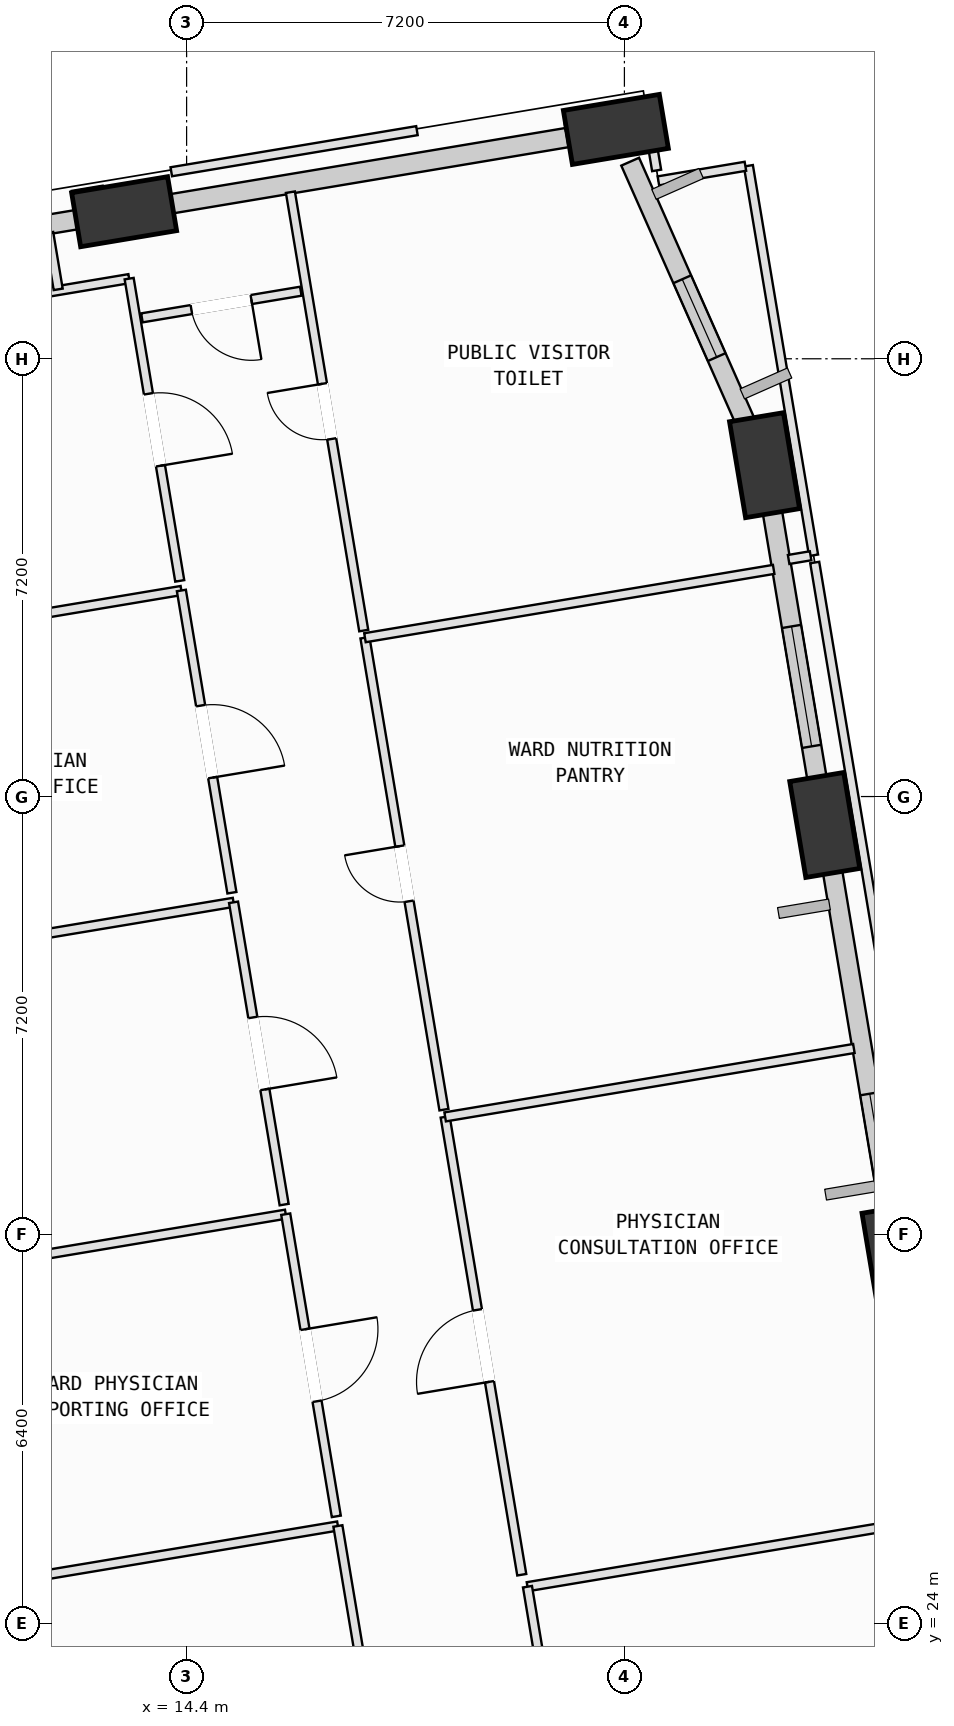
"""IFC4 building model, lengths in metres.
Left out: names, types, materials, properties, quantities, classifications, styles, units other than length and angle.
Written with IfcOpenShell. Run it as: python <this file> out.ifc"""

import sys

from ifc_helpers import new_model, si_unit, direction, frame, frame_2d, origin, origin_2d, place, context, subcontext, project, spatial, rectangle, extrude, element, fill, save


model = new_model("IFC4")
c1 = context("Model", 3, precision=1e-05, world=origin(), true_north=direction((0.0, 1.0)))
c2 = subcontext(c1, "Body", "Model", "MODEL_VIEW")
j1 = project(units=[si_unit("LENGTHUNIT", "METRE"), si_unit("PLANEANGLEUNIT", "RADIAN")], contexts=[c1])
p1 = place(None, origin())
s1 = spatial("IfcSite", under=j1, at=p1, CompositionType="ELEMENT")
p2 = place(p1, origin())
s2 = spatial("IfcBuilding", under=s1, at=p2, CompositionType="ELEMENT")
p3 = place(p2, frame((0.0, 0.0, 63.0)))
s3 = spatial("IfcBuildingStorey", under=s2, at=p3, CompositionType="ELEMENT", Elevation=63.0)
p4 = place(p3, frame((26.083, 30.031, 0.002), z_axis=(-0.021426220941, -0.03131524599, 0.999279876924), x_axis=(0.42032356273, 0.906602224927, 0.037423366641)))
e1 = element("IfcColumn", 1, at=p4, inside=s3, PredefinedType="COLUMN", context=c2, shape_type="SweptSolid", body=[
    extrude(rectangle(XDim=1.6, YDim=0.9, at=origin_2d()), origin(), (0.0, 0.0, 1.0), 4.0),
])
p5 = place(p3, frame((24.895, 37.132, 0.002), z_axis=(-0.050725527972, -0.036398005047, 0.998049150113), x_axis=(0.703550558239, 0.707972386079, 0.061576883259)))
e2 = element("IfcColumn", 2, at=p5, inside=s3, PredefinedType="COLUMN", context=c2, shape_type="SweptSolid", body=[
    extrude(rectangle(XDim=1.6, YDim=0.9, at=origin_2d()), origin(), (0.0, 0.0, 1.0), 4.004),
])
p6 = place(p3, frame((23.905, 43.05, 0.002), z_axis=(-0.075045854901, -0.040657446126, 0.996350887859), x_axis=(0.785410921384, 0.613223631636, 0.084181127184)))
e3 = element("IfcColumn", 3, at=p6, inside=s3, PredefinedType="COLUMN", context=c2, shape_type="SweptSolid", body=[
    extrude(rectangle(XDim=1.6, YDim=0.9, at=origin_2d()), origin(), (0.0, 0.0, 1.0), 4.011),
])
p7 = place(p3, frame((21.46, 48.572, 0.002), z_axis=(-0.09751137938, -0.050820065094, 0.993936040133), x_axis=(0.601306574256, -0.79881226347, 0.018148594608)))
e4 = element("IfcColumn", 4, at=p7, inside=s3, PredefinedType="COLUMN", context=c2, shape_type="SweptSolid", body=[
    extrude(rectangle(XDim=1.6, YDim=0.9, at=origin_2d()), origin(), (0.0, 0.0, 1.0), 4.021),
])
p8 = place(p3, frame((13.372, 47.219, 0.002), z_axis=(-0.091527721681, -0.083950923529, 0.99225748604), x_axis=(0.78736575955, -0.616145251126, 0.020498541485)))
e5 = element("IfcColumn", 5, at=p8, inside=s3, PredefinedType="COLUMN", context=c2, shape_type="SweptSolid", body=[
    extrude(rectangle(XDim=1.6, YDim=0.9, at=origin_2d()), origin(), (0.0, 0.0, 1.0), 4.028),
])
p9 = place(p3, frame((25.993, 30.574, 0.0), z_axis=(0.0, 0.0, 1.0), x_axis=(-0.165052568098, 0.986284771131, 0.0)))
e6 = element("IfcWall", 6, at=p9, inside=s3, PredefinedType="SOLIDWALL", context=c2, shape_type="SweptSolid", body=[
    extrude(rectangle(XDim=5.997, YDim=0.32, at=frame_2d((2.998, 0.0))), origin(), (0.0, 0.0, 1.0), 3.165),
])
p10 = place(p9, frame((0.567, 0.0, 0.75)))
e7 = element("IfcOpeningElement", 7, at=p10, cuts=e6, PredefinedType="OPENING", context=c2, shape_type="SweptSolid", body=[
    extrude(rectangle(XDim=1.6, YDim=1.95, at=frame_2d((0.8, 0.975))), frame((0.0, 0.17, 0.0), z_axis=(0.0, -1.0, 0.0), x_axis=(1.0, 0.0, 0.0)), (0.0, 0.0, 1.0), 0.34),
])
p11 = place(p3, frame((24.806, 37.667, 0.0), z_axis=(0.0, 0.0, 1.0), x_axis=(-0.165048338361, 0.986285478958, 0.0)))
e8 = element("IfcWall", 8, at=p11, inside=s3, PredefinedType="SOLIDWALL", context=c2, shape_type="SweptSolid", body=[
    extrude(rectangle(XDim=4.816, YDim=0.32, at=frame_2d((2.408, 0.0))), origin(), (0.0, 0.0, 1.0), 3.165),
])
p12 = place(p11, frame((0.769, 0.0, 0.75)))
e9 = element("IfcOpeningElement", 9, at=p12, cuts=e8, PredefinedType="OPENING", context=c2, shape_type="SweptSolid", body=[
    extrude(rectangle(XDim=2.0, YDim=1.95, at=frame_2d((1.0, 0.975))), frame((0.0, 0.17, 0.0), z_axis=(0.0, -1.0, 0.0), x_axis=(1.0, 0.0, 0.0)), (0.0, 0.0, 1.0), 0.34),
])
p13 = place(p3, frame((21.695, 48.042, 0.0), z_axis=(0.0, 0.0, 1.0), x_axis=(0.404877849422, -0.914370782039, 0.0)))
e10 = element("IfcWall", 10, at=p13, inside=s3, PredefinedType="SOLIDWALL", context=c2, shape_type="SweptSolid", body=[
    extrude(rectangle(XDim=4.889, YDim=0.32, at=frame_2d((2.445, 0.0))), origin(), (0.0, 0.0, 1.0), 3.165),
])
p14 = place(p13, frame((2.115, 0.0, 0.75)))
e11 = element("IfcOpeningElement", 11, at=p14, cuts=e10, PredefinedType="OPENING", context=c2, shape_type="SweptSolid", body=[
    extrude(rectangle(XDim=1.4, YDim=1.85, at=frame_2d((0.7, 0.925))), frame((0.0, 0.17, 0.0), z_axis=(0.0, -1.0, 0.0), x_axis=(1.0, 0.0, 0.0)), (0.0, 0.0, 1.0), 0.34),
])
p15 = place(p3, frame((13.75, 47.282, 0.0), z_axis=(0.0, 0.0, 1.0), x_axis=(0.986281570607, 0.165071691945, 0.0)))
e12 = element("IfcWall", 12, at=p15, inside=s3, PredefinedType="SOLIDWALL", context=c2, shape_type="SweptSolid", body=[
    extrude(rectangle(XDim=7.003, YDim=0.32, at=frame_2d((3.501, 0.0))), origin(), (0.0, 0.0, 1.0), 3.165),
])
p16 = place(p3, frame((5.643, 45.926, 0.0), z_axis=(0.0, 0.0, 1.0), x_axis=(0.986289610151, 0.16502364954, 0.0)))
e13 = element("IfcWall", 13, at=p16, inside=s3, PredefinedType="SOLIDWALL", context=c2, shape_type="SweptSolid", body=[
    extrude(rectangle(XDim=7.035, YDim=0.32, at=frame_2d((3.517, 0.0))), origin(), (0.0, 0.0, 1.0), 3.165),
])
p17 = place(p3, frame((6.074, 23.793, 0.0), z_axis=(0.0, 0.0, 1.0), x_axis=(0.986279342954, 0.165085001324, 0.0)))
e14 = element("IfcWall", 14, at=p17, inside=s3, PredefinedType="PARTITIONING", context=c2, shape_type="SweptSolid", body=[
    extrude(rectangle(XDim=10.964, YDim=0.15, at=frame_2d((5.482, 0.0))), origin(), (0.0, 0.0, 1.0), 3.78),
])
p18 = place(p3, frame((16.888, 25.603, 0.0), z_axis=(0.0, 0.0, 1.0), x_axis=(0.165082339721, -0.986279788454, 0.0)))
e15 = element("IfcWall", 15, at=p18, inside=s3, PredefinedType="PARTITIONING", context=c2, shape_type="SweptSolid", body=[
    extrude(rectangle(XDim=5.04, YDim=0.15, at=frame_2d((2.52, 0.0))), origin(), (0.0, 0.0, 1.0), 3.78),
])
p19 = place(p3, frame((4.855, 28.861, 0.0), z_axis=(0.0, 0.0, 1.0), x_axis=(0.986288313617, 0.165031398291, 0.0)))
e16 = element("IfcWall", 16, at=p19, inside=s3, PredefinedType="PARTITIONING", context=c2, shape_type="SweptSolid", body=[
    extrude(rectangle(XDim=11.33, YDim=0.15, at=frame_2d((5.665, 0.0))), origin(), (0.0, 0.0, 1.0), 3.78),
])
p20 = place(p3, frame((16.03, 30.731, 0.0), z_axis=(0.0, 0.0, 1.0), x_axis=(0.165113892935, -0.986274506595, 0.0)))
e17 = element("IfcWall", 17, at=p20, inside=s3, PredefinedType="PARTITIONING", context=c2, shape_type="SweptSolid", body=[
    extrude(rectangle(XDim=5.039, YDim=0.15, at=frame_2d((2.52, 0.0))), origin(), (0.0, 0.0, 1.0), 3.78),
])
p21 = place(p20, frame((1.92, 0.0, 0.0)))
e18 = element("IfcOpeningElement", 18, at=p21, cuts=e17, PredefinedType="OPENING", context=c2, shape_type="SweptSolid", body=[
    extrude(rectangle(XDim=1.2, YDim=2.15, at=frame_2d((0.6, 1.075))), frame((0.0, 0.085, 0.0), z_axis=(0.0, -1.0, 0.0), x_axis=(1.0, 0.0, 0.0)), (0.0, 0.0, 1.0), 0.17),
])
p22 = place(p3, frame((4.357, 34.05, 0.0), z_axis=(0.0, 0.0, 1.0), x_axis=(0.986282376627, 0.165066876009, 0.0)))
e19 = element("IfcWall", 19, at=p22, inside=s3, PredefinedType="PARTITIONING", context=c2, shape_type="SweptSolid", body=[
    extrude(rectangle(XDim=10.966, YDim=0.15, at=frame_2d((5.483, 0.0))), origin(), (0.0, 0.0, 1.0), 3.78),
])
p23 = place(p3, frame((15.172, 35.86, 0.0), z_axis=(0.0, 0.0, 1.0), x_axis=(0.165027335267, -0.986288993457, 0.0)))
e20 = element("IfcWall", 20, at=p23, inside=s3, PredefinedType="PARTITIONING", context=c2, shape_type="SweptSolid", body=[
    extrude(rectangle(XDim=5.04, YDim=0.15, at=frame_2d((2.52, 0.0))), origin(), (0.0, 0.0, 1.0), 3.78),
])
p24 = place(p23, frame((1.92, 0.0, 0.0)))
e21 = element("IfcOpeningElement", 21, at=p24, cuts=e20, PredefinedType="OPENING", context=c2, shape_type="SweptSolid", body=[
    extrude(rectangle(XDim=1.2, YDim=2.15, at=frame_2d((0.6, 1.075))), frame((0.0, 0.085, 0.0), z_axis=(0.0, -1.0, 0.0), x_axis=(1.0, 0.0, 0.0)), (0.0, 0.0, 1.0), 0.17),
])
p25 = place(p3, frame((3.499, 39.179, 0.0), z_axis=(0.0, 0.0, 1.0), x_axis=(0.986281769972, 0.165070500758, 0.0)))
e22 = element("IfcWall", 22, at=p25, inside=s3, PredefinedType="PARTITIONING", context=c2, shape_type="SweptSolid", body=[
    extrude(rectangle(XDim=10.965, YDim=0.15, at=frame_2d((5.483, 0.0))), origin(), (0.0, 0.0, 1.0), 3.78),
])
p26 = place(p3, frame((14.314, 40.989, 0.0), z_axis=(0.0, 0.0, 1.0), x_axis=(0.16489385241, -0.986311318721, 0.0)))
e23 = element("IfcWall", 23, at=p26, inside=s3, PredefinedType="PARTITIONING", context=c2, shape_type="SweptSolid", body=[
    extrude(rectangle(XDim=5.04, YDim=0.15, at=frame_2d((2.52, 0.0))), origin(), (0.0, 0.0, 1.0), 3.78),
])
p27 = place(p26, frame((1.92, 0.0, 0.0)))
e24 = element("IfcOpeningElement", 24, at=p27, cuts=e23, PredefinedType="OPENING", context=c2, shape_type="SweptSolid", body=[
    extrude(rectangle(XDim=1.2, YDim=2.15, at=frame_2d((0.6, 1.075))), frame((0.0, 0.085, 0.0), z_axis=(0.0, -1.0, 0.0), x_axis=(1.0, 0.0, 0.0)), (0.0, 0.0, 1.0), 0.17),
])
p28 = place(p3, frame((4.79, 44.667, 0.0), z_axis=(0.0, 0.0, 1.0), x_axis=(0.986268967524, 0.165146976051, 0.0)))
e25 = element("IfcWall", 25, at=p28, inside=s3, PredefinedType="PARTITIONING", context=c2, shape_type="SweptSolid", body=[
    extrude(rectangle(XDim=8.786, YDim=0.15, at=frame_2d((4.393, 0.0))), origin(), (0.0, 0.0, 1.0), 3.78),
])
p29 = place(p3, frame((13.455, 46.118, 0.0), z_axis=(0.0, 0.0, 1.0), x_axis=(0.165082339721, -0.986279788454, 0.0)))
e26 = element("IfcWall", 26, at=p29, inside=s3, PredefinedType="PARTITIONING", context=c2, shape_type="SweptSolid", body=[
    extrude(rectangle(XDim=5.04, YDim=0.15, at=frame_2d((2.52, 0.0))), origin(), (0.0, 0.0, 1.0), 2.865),
])
p30 = place(p29, frame((1.92, 0.0, 0.0)))
e27 = element("IfcOpeningElement", 27, at=p30, cuts=e26, PredefinedType="OPENING", context=c2, shape_type="SweptSolid", body=[
    extrude(rectangle(XDim=1.2, YDim=2.15, at=frame_2d((0.6, 1.075))), frame((0.0, 0.085, 0.0), z_axis=(0.0, -1.0, 0.0), x_axis=(1.0, 0.0, 0.0)), (0.0, 0.0, 1.0), 0.17),
])
p31 = place(p3, frame((20.006, 24.604, 0.0), z_axis=(0.0, 0.0, 1.0), x_axis=(0.986281351786, 0.165072999363, 0.0)))
e28 = element("IfcWall", 28, at=p31, inside=s3, PredefinedType="PARTITIONING", context=c2, shape_type="SweptSolid", body=[
    extrude(rectangle(XDim=6.755, YDim=0.15, at=frame_2d((3.377, 0.0))), origin(), (0.0, 0.0, 1.0), 3.78),
])
p32 = place(p3, frame((20.679, 20.58, 0.0), z_axis=(0.0, 0.0, 1.0), x_axis=(-0.164922980953, 0.9863064485, 0.0)))
e29 = element("IfcWall", 29, at=p32, inside=s3, PredefinedType="PARTITIONING", context=c2, shape_type="SweptSolid", body=[
    extrude(rectangle(XDim=4.08, YDim=0.15, at=frame_2d((2.04, 0.0))), origin(), (0.0, 0.0, 1.0), 3.78),
])
p33 = place(p3, frame((19.912, 24.801, 0.0), z_axis=(0.0, 0.0, 1.0), x_axis=(-0.165036777902, 0.986287413455, 0.0)))
e30 = element("IfcWall", 30, at=p33, inside=s3, PredefinedType="PARTITIONING", context=c2, shape_type="SweptSolid", body=[
    extrude(rectangle(XDim=7.635, YDim=0.15, at=frame_2d((3.817, 0.0))), origin(), (0.0, 0.0, 1.0), 3.78),
])
p34 = place(p33, frame((3.217, 0.0, 0.0)))
e31 = element("IfcOpeningElement", 31, at=p34, cuts=e30, PredefinedType="OPENING", context=c2, shape_type="SweptSolid", body=[
    extrude(rectangle(XDim=1.2, YDim=2.15, at=frame_2d((0.6, 1.075))), frame((0.0, 0.085, 0.0), z_axis=(0.0, -1.0, 0.0), x_axis=(1.0, 0.0, 0.0)), (0.0, 0.0, 1.0), 0.17),
])
p35 = place(p3, frame((18.652, 32.331, 0.0), z_axis=(0.0, 0.0, 1.0), x_axis=(0.986282359513, 0.165066978267, 0.0)))
e32 = element("IfcWall", 32, at=p35, inside=s3, PredefinedType="PARTITIONING", context=c2, shape_type="SweptSolid", body=[
    extrude(rectangle(XDim=6.815, YDim=0.15, at=frame_2d((3.408, 0.0))), origin(), (0.0, 0.0, 1.0), 3.78),
])
p36 = place(p3, frame((18.632, 32.45, 0.0), z_axis=(0.0, 0.0, 1.0), x_axis=(-0.165068018391, 0.986282185434, 0.0)))
e33 = element("IfcWall", 33, at=p36, inside=s3, PredefinedType="PARTITIONING", context=c2, shape_type="SweptSolid", body=[
    extrude(rectangle(XDim=7.87, YDim=0.15, at=frame_2d((3.935, 0.0))), origin(), (0.0, 0.0, 1.0), 3.78),
])
p37 = place(p36, frame((3.475, 0.0, 0.0)))
e34 = element("IfcOpeningElement", 34, at=p37, cuts=e33, PredefinedType="OPENING", context=c2, shape_type="SweptSolid", body=[
    extrude(rectangle(XDim=0.92, YDim=2.1, at=frame_2d((0.46, 1.05))), frame((0.0, 0.085, 0.0), z_axis=(0.0, -1.0, 0.0), x_axis=(1.0, 0.0, 0.0)), (0.0, 0.0, 1.0), 0.17),
])
p38 = place(p3, frame((17.333, 40.212, 0.0), z_axis=(0.0, 0.0, 1.0), x_axis=(0.986305677768, 0.164927590181, 0.0)))
e35 = element("IfcWall", 35, at=p38, inside=s3, PredefinedType="PARTITIONING", context=c2, shape_type="SweptSolid", body=[
    extrude(rectangle(XDim=6.815, YDim=0.15, at=frame_2d((3.408, 0.0))), origin(), (0.0, 0.0, 1.0), 3.78),
])
p39 = place(p3, frame((24.73, 41.449, 0.0), z_axis=(0.0, 0.0, 1.0), x_axis=(0.165068018391, -0.986282185434, 0.0)))
e36 = element("IfcWall", 36, at=p39, inside=s3, PredefinedType="PARTITIONING", context=c2, shape_type="SweptSolid", body=[
    extrude(rectangle(XDim=7.87, YDim=0.15, at=frame_2d((3.935, 0.0))), origin(), (0.0, 0.0, 1.0), 3.78),
])
p40 = place(p3, frame((23.639, 47.974, 0.0), z_axis=(0.0, 0.0, 1.0), x_axis=(0.165051162873, -0.986285006291, 0.0)))
e37 = element("IfcWall", 37, at=p40, inside=s3, PredefinedType="PARTITIONING", context=c2, shape_type="SweptSolid", body=[
    extrude(rectangle(XDim=6.495, YDim=0.15, at=frame_2d((3.248, 0.0))), origin(), (0.0, 0.0, 1.0), 3.78),
])
p41 = place(p3, frame((24.662, 41.56, 0.0), z_axis=(0.0, 0.0, 1.0), x_axis=(-0.98601292781, -0.166668851895, 0.0)))
e38 = element("IfcWall", 38, at=p41, inside=s3, PredefinedType="PARTITIONING", context=c2, shape_type="SweptSolid", body=[
    extrude(rectangle(XDim=0.366, YDim=0.15, at=frame_2d((0.183, 0.0))), origin(), (0.0, 0.0, 1.0), 3.78),
])
p42 = place(p3, frame((17.313, 40.33, 0.0), z_axis=(0.0, 0.0, 1.0), x_axis=(-0.164983866738, 0.986296265691, 0.0)))
e39 = element("IfcWall", 39, at=p42, inside=s3, PredefinedType="PARTITIONING", context=c2, shape_type="SweptSolid", body=[
    extrude(rectangle(XDim=7.31, YDim=0.15, at=frame_2d((3.655, 0.0))), origin(), (0.0, 0.0, 1.0), 3.78),
])
p43 = place(p42, frame((3.195, 0.0, 0.0)))
e40 = element("IfcOpeningElement", 40, at=p43, cuts=e39, PredefinedType="OPENING", context=c2, shape_type="SweptSolid", body=[
    extrude(rectangle(XDim=0.92, YDim=2.1, at=frame_2d((0.46, 1.05))), frame((0.0, 0.085, 0.0), z_axis=(0.0, -1.0, 0.0), x_axis=(1.0, 0.0, 0.0)), (0.0, 0.0, 1.0), 0.17),
])
p44 = place(p3, frame((20.625, 48.626, 0.0), z_axis=(0.0, 0.0, 1.0), x_axis=(0.986301899807, 0.164950181684, 0.0)))
e41 = element("IfcWall", 41, at=p44, inside=s3, PredefinedType="PARTITIONING", context=c2, shape_type="SweptSolid", body=[
    extrude(rectangle(XDim=1.365, YDim=0.15, at=frame_2d((0.682, 0.0))), origin(), (0.0, 0.0, 1.0), 3.165),
])
p45 = place(p3, frame((21.979, 48.802, 0.0), z_axis=(0.0, 0.0, 1.0), x_axis=(0.164614956806, -0.986357904615, 0.0)))
e42 = element("IfcWall", 42, at=p45, inside=s3, PredefinedType="PARTITIONING", context=c2, shape_type="SweptSolid", body=[
    extrude(rectangle(XDim=0.917, YDim=0.15, at=frame_2d((0.458, 0.0))), origin(), (0.0, 0.0, 1.0), 3.78),
])
p46 = place(p3, frame((22.159, 47.726, 0.0), z_axis=(0.0, 0.0, 1.0), x_axis=(0.986229740744, 0.16538107048, 0.0)))
e43 = element("IfcWall", 43, at=p46, inside=s3, PredefinedType="PARTITIONING", context=c2, shape_type="SweptSolid", body=[
    extrude(rectangle(XDim=1.451, YDim=0.15, at=frame_2d((0.726, 0.0))), origin(), (0.0, 0.0, 1.0), 3.78),
])
p47 = place(p3, frame((12.132, 46.874, 0.0), z_axis=(0.0, 0.0, 1.0), x_axis=(0.165069196057, -0.986281988335, 0.0)))
e44 = element("IfcWall", 44, at=p47, inside=s3, PredefinedType="PARTITIONING", context=c2, shape_type="SweptSolid", body=[
    extrude(rectangle(XDim=0.945, YDim=0.15, at=frame_2d((0.473, 0.0))), origin(), (0.0, 0.0, 1.0), 3.78),
])
p48 = place(p3, frame((14.148, 47.876, 0.0), z_axis=(0.0, 0.0, 1.0), x_axis=(0.986287401188, 0.165036851214, 0.0)))
e45 = element("IfcWall", 45, at=p48, inside=s3, PredefinedType="PARTITIONING", context=c2, shape_type="SweptSolid", body=[
    extrude(rectangle(XDim=4.096, YDim=0.15, at=frame_2d((2.048, 0.0))), origin(), (0.0, 0.0, 1.0), 3.78),
])
p49 = place(p3, frame((16.278, 45.911, 0.0), z_axis=(0.0, 0.0, 1.0), x_axis=(-0.986241585852, -0.165310418109, 0.0)))
e46 = element("IfcWall", 46, at=p49, inside=s3, PredefinedType="PARTITIONING", context=c2, shape_type="SweptSolid", body=[
    extrude(rectangle(XDim=2.649, YDim=0.15, at=frame_2d((1.325, 0.0))), origin(), (0.0, 0.0, 1.0), 3.78),
])
p50 = place(p49, frame((0.825, 0.0, 0.0)))
e47 = element("IfcOpeningElement", 47, at=p50, cuts=e46, PredefinedType="OPENING", context=c2, shape_type="SweptSolid", body=[
    extrude(rectangle(XDim=1.0, YDim=2.12, at=frame_2d((0.5, 1.06))), frame((0.0, 0.085, 0.0), z_axis=(0.0, -1.0, 0.0), x_axis=(1.0, 0.0, 0.0)), (0.0, 0.0, 1.0), 0.17),
])
p51 = place(p10, origin())
e48 = element("IfcWindow", 48, at=p51, inside=s3, PartitioningType="SINGLE_PANEL", PredefinedType="WINDOW", context=c2, shape_type="SweptSolid", body=[
    extrude(rectangle(XDim=1.6, YDim=1.95, at=frame_2d((0.8, 0.975))), frame((0.0, 0.03, 0.0), z_axis=(0.0, -1.0, 0.0), x_axis=(1.0, 0.0, 0.0)), (0.0, 0.0, 1.0), 0.06),
])
fill(e7, e48)
p52 = place(p12, origin())
e49 = element("IfcWindow", 49, at=p52, inside=s3, PartitioningType="SINGLE_PANEL", PredefinedType="WINDOW", context=c2, shape_type="SweptSolid", body=[
    extrude(rectangle(XDim=2.0, YDim=1.95, at=frame_2d((1.0, 0.975))), frame((0.0, 0.03, 0.0), z_axis=(0.0, -1.0, 0.0), x_axis=(1.0, 0.0, 0.0)), (0.0, 0.0, 1.0), 0.06),
])
fill(e9, e49)
p53 = place(p14, origin())
e50 = element("IfcWindow", 50, at=p53, inside=s3, PartitioningType="SINGLE_PANEL", PredefinedType="WINDOW", context=c2, shape_type="SweptSolid", body=[
    extrude(rectangle(XDim=1.4, YDim=1.85, at=frame_2d((0.7, 0.925))), frame((0.0, 0.03, 0.0), z_axis=(0.0, -1.0, 0.0), x_axis=(1.0, 0.0, 0.0)), (0.0, 0.0, 1.0), 0.06),
])
fill(e11, e50)
p54 = place(p21, origin())
e51 = element("IfcDoor", 51, at=p54, inside=s3, OperationType="SINGLE_SWING_LEFT", PredefinedType="DOOR", context=c2, shape_type="SweptSolid", body=[
    extrude(rectangle(XDim=1.2, YDim=2.15, at=frame_2d((0.6, 1.075))), frame((0.0, 0.025, 0.0), z_axis=(0.0, -1.0, 0.0), x_axis=(1.0, 0.0, 0.0)), (0.0, 0.0, 1.0), 0.05),
])
fill(e18, e51)
p55 = place(p24, origin())
e52 = element("IfcDoor", 52, at=p55, inside=s3, OperationType="SINGLE_SWING_RIGHT", PredefinedType="DOOR", context=c2, shape_type="SweptSolid", body=[
    extrude(rectangle(XDim=1.2, YDim=2.15, at=frame_2d((0.6, 1.075))), frame((0.0, 0.025, 0.0), z_axis=(0.0, -1.0, 0.0), x_axis=(1.0, 0.0, 0.0)), (0.0, 0.0, 1.0), 0.05),
])
fill(e21, e52)
p56 = place(p27, origin())
e53 = element("IfcDoor", 53, at=p56, inside=s3, OperationType="SINGLE_SWING_RIGHT", PredefinedType="DOOR", context=c2, shape_type="SweptSolid", body=[
    extrude(rectangle(XDim=1.2, YDim=2.15, at=frame_2d((0.6, 1.075))), frame((0.0, 0.025, 0.0), z_axis=(0.0, -1.0, 0.0), x_axis=(1.0, 0.0, 0.0)), (0.0, 0.0, 1.0), 0.05),
])
fill(e24, e53)
p57 = place(p30, origin())
e54 = element("IfcDoor", 54, at=p57, inside=s3, OperationType="SINGLE_SWING_RIGHT", PredefinedType="DOOR", context=c2, shape_type="SweptSolid", body=[
    extrude(rectangle(XDim=1.2, YDim=2.15, at=frame_2d((0.6, 1.075))), frame((0.0, 0.025, 0.0), z_axis=(0.0, -1.0, 0.0), x_axis=(1.0, 0.0, 0.0)), (0.0, 0.0, 1.0), 0.05),
])
fill(e27, e54)
p58 = place(p34, origin())
e55 = element("IfcDoor", 55, at=p58, inside=s3, OperationType="SINGLE_SWING_LEFT", PredefinedType="DOOR", context=c2, shape_type="SweptSolid", body=[
    extrude(rectangle(XDim=1.2, YDim=2.15, at=frame_2d((0.6, 1.075))), frame((0.0, 0.025, 0.0), z_axis=(0.0, -1.0, 0.0), x_axis=(1.0, 0.0, 0.0)), (0.0, 0.0, 1.0), 0.05),
])
fill(e31, e55)
p59 = place(p37, origin())
e56 = element("IfcDoor", 56, at=p59, inside=s3, OperationType="SINGLE_SWING_RIGHT", PredefinedType="DOOR", context=c2, shape_type="SweptSolid", body=[
    extrude(rectangle(XDim=0.92, YDim=2.1, at=frame_2d((0.46, 1.05))), frame((0.0, 0.025, 0.0), z_axis=(0.0, -1.0, 0.0), x_axis=(1.0, 0.0, 0.0)), (0.0, 0.0, 1.0), 0.05),
])
fill(e34, e56)
p60 = place(p43, origin())
e57 = element("IfcDoor", 57, at=p60, inside=s3, OperationType="SINGLE_SWING_RIGHT", PredefinedType="DOOR", context=c2, shape_type="SweptSolid", body=[
    extrude(rectangle(XDim=0.92, YDim=2.1, at=frame_2d((0.46, 1.05))), frame((0.0, 0.025, 0.0), z_axis=(0.0, -1.0, 0.0), x_axis=(1.0, 0.0, 0.0)), (0.0, 0.0, 1.0), 0.05),
])
fill(e40, e57)
p61 = place(p50, origin())
e58 = element("IfcDoor", 58, at=p61, inside=s3, OperationType="SINGLE_SWING_LEFT", PredefinedType="DOOR", context=c2, shape_type="SweptSolid", body=[
    extrude(rectangle(XDim=1.0, YDim=2.12, at=frame_2d((0.5, 1.06))), frame((0.0, 0.025, 0.0), z_axis=(0.0, -1.0, 0.0), x_axis=(1.0, 0.0, 0.0)), (0.0, 0.0, 1.0), 0.05),
])
fill(e47, e58)
save(model, sys.argv[1])
